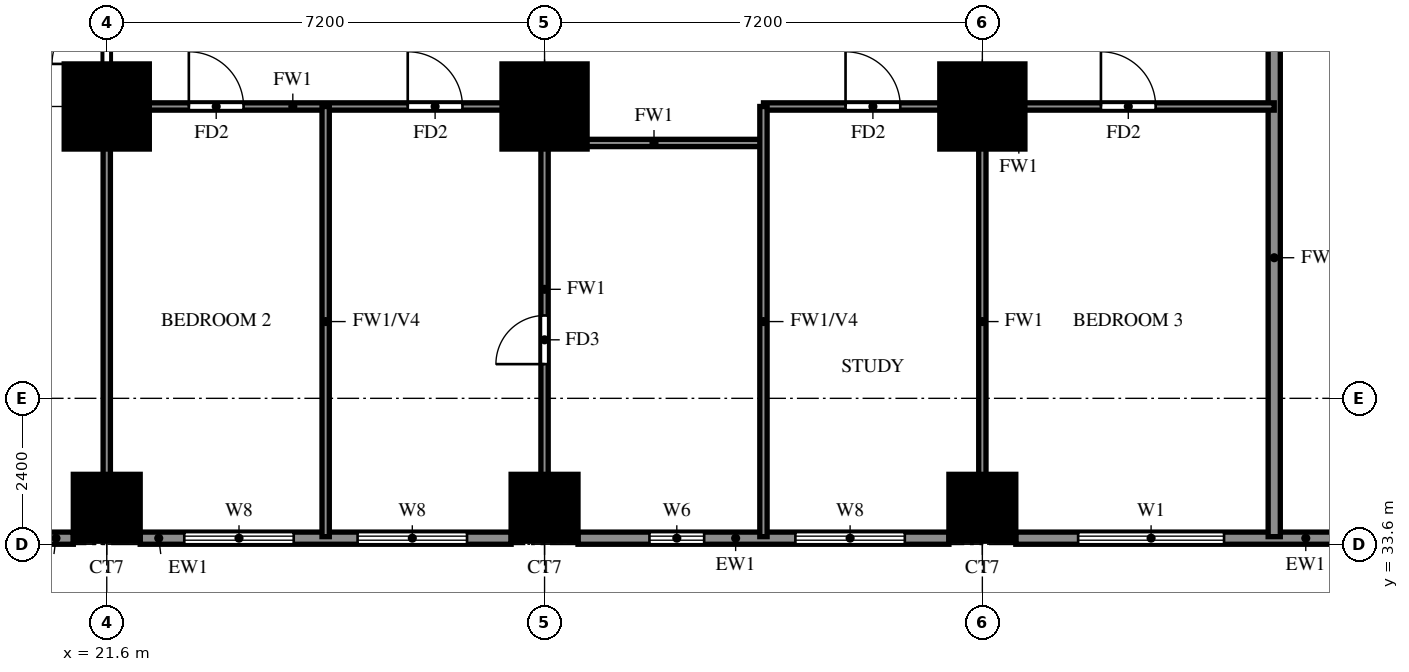
"""IFC4 building model, lengths in metres.
Left out: names, types, materials, properties, quantities, classifications, styles, units other than length and angle.
Written with IfcOpenShell. Run it as: python <this file> out.ifc"""

import sys

from ifc_helpers import new_model, si_unit, direction, frame, frame_2d, origin, origin_2d, place, context, subcontext, project, spatial, rectangle, extrude, source, transform, mapped, element, fill, save


model = new_model("IFC4")
c1 = context("Model", 3, precision=1e-05, world=origin(), true_north=direction((0.0, 1.0)))
c2 = subcontext(c1, "Body", "Model", "MODEL_VIEW")
j1 = project(units=[si_unit("LENGTHUNIT", "METRE"), si_unit("PLANEANGLEUNIT", "RADIAN")], contexts=[c1])
p1 = place(None, origin())
s1 = spatial("IfcSite", under=j1, at=p1, CompositionType="ELEMENT")
p2 = place(p1, origin())
s2 = spatial("IfcBuilding", under=s1, at=p2, CompositionType="ELEMENT")
p3 = place(p2, frame((0.0, 0.0, 30.5)))
s3 = spatial("IfcBuildingStorey", under=s2, at=p3, CompositionType="ELEMENT", Elevation=30.5)
m1 = source(origin(), c2, "Body", "SweptSolid", [
    extrude(rectangle(XDim=1.1, YDim=1.1, at=origin_2d()), origin(), (0.0, 0.0, 1.0), 3.18),
])
for number, where, z_axis, x_axis in (
    (1, (21.6, 34.2, 0.0), (0.0, 0.0, 1.0), (1.0, 0.0, 0.0)),
    (2, (28.8, 34.2, 0.0), (0.0, 0.0, 1.0), (1.0, 0.0, 0.0)),
    (3, (36.0, 34.2, 0.0), (0.0, 0.0, 1.0), (1.0, 0.0, 0.0)),
):
    element("IfcColumn", number, at=place(p3, frame(where, z_axis=z_axis, x_axis=x_axis)), inside=s3, PredefinedType="COLUMN", context=c2, shape_type="MappedRepresentation", body=[
        mapped(m1, transform((0.0, 0.0, 0.0))),
    ])
m2 = source(origin(), c2, "Body", "SweptSolid", [
    extrude(rectangle(XDim=1.4, YDim=1.4, at=origin_2d()), origin(), (0.0, 0.0, 1.0), 3.18),
])
for number, where, z_axis, x_axis in (
    (4, (21.6, 40.8, 0.0), (0.0, 0.0, 1.0), (1.0, 0.0, 0.0)),
    (5, (28.8, 40.8, 0.0), (0.0, 0.0, 1.0), (1.0, 0.0, 0.0)),
    (6, (36.0, 40.8, 0.0), (0.0, 0.0, 1.0), (1.0, 0.0, 0.0)),
):
    element("IfcColumn", number, at=place(p3, frame(where, z_axis=z_axis, x_axis=x_axis)), inside=s3, PredefinedType="COLUMN", context=c2, shape_type="MappedRepresentation", body=[
        mapped(m2, transform((0.0, 0.0, 0.0))),
    ])
p4 = place(p3, frame((18.2, 33.7, 0.0), z_axis=(0.0, 0.0, 1.0), x_axis=(1.0, 0.0, 0.0)))
e7 = element("IfcWall", 7, at=p4, inside=s3, PredefinedType="SOLIDWALL", context=c2, shape_type="SweptSolid", body=[
    extrude(rectangle(XDim=2.85, YDim=0.2, at=frame_2d((1.425, 0.0))), origin(), (0.0, 0.0, 1.0), 3.18),
])
p5 = place(p4, frame((0.525, 0.0, 0.6)))
e8 = element("IfcOpeningElement", 8, at=p5, cuts=e7, PredefinedType="OPENING", context=c2, shape_type="SweptSolid", body=[
    extrude(rectangle(XDim=1.8, YDim=2.4, at=frame_2d((0.9, 1.2))), frame((0.0, 0.11, 0.0), z_axis=(0.0, -1.0, 0.0), x_axis=(1.0, 0.0, 0.0)), (0.0, 0.0, 1.0), 0.22),
])
p6 = place(p3, frame((22.15, 33.7, 0.0), z_axis=(0.0, 0.0, 1.0), x_axis=(1.0, 0.0, 0.0)))
e9 = element("IfcWall", 9, at=p6, inside=s3, PredefinedType="SOLIDWALL", context=c2, shape_type="SweptSolid", body=[
    extrude(rectangle(XDim=6.1, YDim=0.2, at=frame_2d((3.05, 0.0))), origin(), (0.0, 0.0, 1.0), 3.18),
])
p7 = place(p6, frame((0.725, 0.0, 0.6)))
e10 = element("IfcOpeningElement", 10, at=p7, cuts=e9, PredefinedType="OPENING", context=c2, shape_type="SweptSolid", body=[
    extrude(rectangle(XDim=1.8, YDim=2.4, at=frame_2d((0.9, 1.2))), frame((0.0, 0.11, 0.0), z_axis=(0.0, -1.0, 0.0), x_axis=(1.0, 0.0, 0.0)), (0.0, 0.0, 1.0), 0.22),
])
p8 = place(p6, frame((3.575, 0.0, 0.6)))
e11 = element("IfcOpeningElement", 11, at=p8, cuts=e9, PredefinedType="OPENING", context=c2, shape_type="SweptSolid", body=[
    extrude(rectangle(XDim=1.8, YDim=2.4, at=frame_2d((0.9, 1.2))), frame((0.0, 0.11, 0.0), z_axis=(0.0, -1.0, 0.0), x_axis=(1.0, 0.0, 0.0)), (0.0, 0.0, 1.0), 0.22),
])
p9 = place(p3, frame((29.35, 33.7, 0.0), z_axis=(0.0, 0.0, 1.0), x_axis=(1.0, 0.0, 0.0)))
e12 = element("IfcWall", 12, at=p9, inside=s3, PredefinedType="SOLIDWALL", context=c2, shape_type="SweptSolid", body=[
    extrude(rectangle(XDim=6.1, YDim=0.2, at=frame_2d((3.05, 0.0))), origin(), (0.0, 0.0, 1.0), 3.18),
])
p10 = place(p9, frame((1.175, 0.0, 1.5)))
e13 = element("IfcOpeningElement", 13, at=p10, cuts=e12, PredefinedType="OPENING", context=c2, shape_type="SweptSolid", body=[
    extrude(rectangle(XDim=0.9, YDim=0.9, at=frame_2d((0.45, 0.45))), frame((0.0, 0.11, 0.0), z_axis=(0.0, -1.0, 0.0), x_axis=(1.0, 0.0, 0.0)), (0.0, 0.0, 1.0), 0.22),
])
p11 = place(p9, frame((3.575, 0.0, 0.6)))
e14 = element("IfcOpeningElement", 14, at=p11, cuts=e12, PredefinedType="OPENING", context=c2, shape_type="SweptSolid", body=[
    extrude(rectangle(XDim=1.8, YDim=2.4, at=frame_2d((0.9, 1.2))), frame((0.0, 0.11, 0.0), z_axis=(0.0, -1.0, 0.0), x_axis=(1.0, 0.0, 0.0)), (0.0, 0.0, 1.0), 0.22),
])
p12 = place(p3, frame((36.55, 33.7, 0.0), z_axis=(0.0, 0.0, 1.0), x_axis=(1.0, 0.0, 0.0)))
e15 = element("IfcWall", 15, at=p12, inside=s3, PredefinedType="SOLIDWALL", context=c2, shape_type="SweptSolid", body=[
    extrude(rectangle(XDim=5.45, YDim=0.2, at=frame_2d((2.725, 0.0))), origin(), (0.0, 0.0, 1.0), 3.18),
])
p13 = place(p12, frame((1.025, 0.0, 0.6)))
e16 = element("IfcOpeningElement", 16, at=p13, cuts=e15, PredefinedType="OPENING", context=c2, shape_type="SweptSolid", body=[
    extrude(rectangle(XDim=2.4, YDim=2.4, at=frame_2d((1.2, 1.2))), frame((0.0, 0.11, 0.0), z_axis=(0.0, -1.0, 0.0), x_axis=(1.0, 0.0, 0.0)), (0.0, 0.0, 1.0), 0.22),
])
p14 = place(p3, frame((40.8, 33.725, 0.0), z_axis=(0.0, 0.0, 1.0), x_axis=(0.0, 1.0, 0.0)))
e17 = element("IfcWall", 17, at=p14, inside=s3, PredefinedType="SOLIDWALL", context=c2, shape_type="SweptSolid", body=[
    extrude(rectangle(XDim=9.175, YDim=0.2, at=frame_2d((4.587, 0.0))), origin(), (0.0, 0.0, 1.0), 2.28),
])
p15 = place(p3, frame((28.8, 40.2, 0.0), z_axis=(0.0, 0.0, 1.0), x_axis=(1.0, 0.0, 0.0)))
e18 = element("IfcWall", 18, at=p15, inside=s3, PredefinedType="PARTITIONING", context=c2, shape_type="SweptSolid", body=[
    extrude(rectangle(XDim=3.6, YDim=0.12, at=frame_2d((1.8, 0.0))), origin(), (0.0, 0.0, 1.0), 3.18),
])
p16 = place(p3, frame((21.6, 40.8, 0.0), z_axis=(0.0, 0.0, 1.0), x_axis=(1.0, 0.0, 0.0)))
e19 = element("IfcWall", 19, at=p16, inside=s3, PredefinedType="PARTITIONING", context=c2, shape_type="SweptSolid", body=[
    extrude(rectangle(XDim=7.2, YDim=0.12, at=frame_2d((3.6, 0.0))), origin(), (0.0, 0.0, 1.0), 3.18),
])
p17 = place(p16, frame((1.35, 0.0, 0.0)))
e20 = element("IfcOpeningElement", 20, at=p17, cuts=e19, PredefinedType="OPENING", context=c2, shape_type="SweptSolid", body=[
    extrude(rectangle(XDim=0.9, YDim=2.1, at=frame_2d((0.45, 1.05))), frame((0.0, 0.07, 0.0), z_axis=(0.0, -1.0, 0.0), x_axis=(1.0, 0.0, 0.0)), (0.0, 0.0, 1.0), 0.14),
])
p18 = place(p16, frame((4.95, 0.0, 0.0)))
e21 = element("IfcOpeningElement", 21, at=p18, cuts=e19, PredefinedType="OPENING", context=c2, shape_type="SweptSolid", body=[
    extrude(rectangle(XDim=0.9, YDim=2.1, at=frame_2d((0.45, 1.05))), frame((0.0, 0.07, 0.0), z_axis=(0.0, -1.0, 0.0), x_axis=(1.0, 0.0, 0.0)), (0.0, 0.0, 1.0), 0.14),
])
p19 = place(p3, frame((32.4, 40.8, 0.0), z_axis=(0.0, 0.0, 1.0), x_axis=(1.0, 0.0, 0.0)))
e22 = element("IfcWall", 22, at=p19, inside=s3, PredefinedType="PARTITIONING", context=c2, shape_type="SweptSolid", body=[
    extrude(rectangle(XDim=8.4, YDim=0.12, at=frame_2d((4.2, 0.0))), origin(), (0.0, 0.0, 1.0), 3.18),
])
p20 = place(p19, frame((1.35, 0.0, 0.0)))
e23 = element("IfcOpeningElement", 23, at=p20, cuts=e22, PredefinedType="OPENING", context=c2, shape_type="SweptSolid", body=[
    extrude(rectangle(XDim=0.9, YDim=2.1, at=frame_2d((0.45, 1.05))), frame((0.0, 0.07, 0.0), z_axis=(0.0, -1.0, 0.0), x_axis=(1.0, 0.0, 0.0)), (0.0, 0.0, 1.0), 0.14),
])
p21 = place(p19, frame((5.55, 0.0, 0.0)))
e24 = element("IfcOpeningElement", 24, at=p21, cuts=e22, PredefinedType="OPENING", context=c2, shape_type="SweptSolid", body=[
    extrude(rectangle(XDim=0.9, YDim=2.1, at=frame_2d((0.45, 1.05))), frame((0.0, 0.07, 0.0), z_axis=(0.0, -1.0, 0.0), x_axis=(1.0, 0.0, 0.0)), (0.0, 0.0, 1.0), 0.14),
])
p22 = place(p3, frame((21.6, 33.725, 0.0), z_axis=(0.0, 0.0, 1.0), x_axis=(0.0, 1.0, 0.0)))
e25 = element("IfcWall", 25, at=p22, inside=s3, PredefinedType="PARTITIONING", context=c2, shape_type="SweptSolid", body=[
    extrude(rectangle(XDim=35.875, YDim=0.12, at=frame_2d((17.938, 0.0))), origin(), (0.0, 0.0, 1.0), 3.18),
])
p23 = place(p22, frame((7.775, 0.0, 0.0)))
e26 = element("IfcOpeningElement", 26, at=p23, cuts=e25, PredefinedType="OPENING", context=c2, shape_type="SweptSolid", body=[
    extrude(rectangle(XDim=0.9, YDim=2.1, at=frame_2d((0.45, 1.05))), frame((0.0, 0.07, 0.0), z_axis=(0.0, -1.0, 0.0), x_axis=(1.0, 0.0, 0.0)), (0.0, 0.0, 1.0), 0.14),
])
p24 = place(p22, frame((15.625, 0.0, 0.0)))
e27 = element("IfcOpeningElement", 27, at=p24, cuts=e25, PredefinedType="OPENING", context=c2, shape_type="SweptSolid", body=[
    extrude(rectangle(XDim=0.9, YDim=2.1, at=frame_2d((0.45, 1.05))), frame((0.0, 0.07, 0.0), z_axis=(0.0, -1.0, 0.0), x_axis=(1.0, 0.0, 0.0)), (0.0, 0.0, 1.0), 0.14),
])
p25 = place(p22, frame((22.225, 0.0, 0.0)))
e28 = element("IfcOpeningElement", 28, at=p25, cuts=e25, PredefinedType="OPENING", context=c2, shape_type="SweptSolid", body=[
    extrude(rectangle(XDim=1.5, YDim=2.1, at=frame_2d((0.75, 1.05))), frame((0.0, 0.07, 0.0), z_axis=(0.0, -1.0, 0.0), x_axis=(1.0, 0.0, 0.0)), (0.0, 0.0, 1.0), 0.14),
])
p26 = place(p22, frame((26.425, 0.0, 0.0)))
e29 = element("IfcOpeningElement", 29, at=p26, cuts=e25, PredefinedType="OPENING", context=c2, shape_type="SweptSolid", body=[
    extrude(rectangle(XDim=0.9, YDim=2.1, at=frame_2d((0.45, 1.05))), frame((0.0, 0.07, 0.0), z_axis=(0.0, -1.0, 0.0), x_axis=(1.0, 0.0, 0.0)), (0.0, 0.0, 1.0), 0.14),
])
p27 = place(p22, frame((30.025, 0.0, 0.0)))
e30 = element("IfcOpeningElement", 30, at=p27, cuts=e25, PredefinedType="OPENING", context=c2, shape_type="SweptSolid", body=[
    extrude(rectangle(XDim=0.9, YDim=2.1, at=frame_2d((0.45, 1.05))), frame((0.0, 0.07, 0.0), z_axis=(0.0, -1.0, 0.0), x_axis=(1.0, 0.0, 0.0)), (0.0, 0.0, 1.0), 0.14),
])
p28 = place(p22, frame((33.625, 0.0, 0.0)))
e31 = element("IfcOpeningElement", 31, at=p28, cuts=e25, PredefinedType="OPENING", context=c2, shape_type="SweptSolid", body=[
    extrude(rectangle(XDim=0.9, YDim=2.1, at=frame_2d((0.45, 1.05))), frame((0.0, 0.07, 0.0), z_axis=(0.0, -1.0, 0.0), x_axis=(1.0, 0.0, 0.0)), (0.0, 0.0, 1.0), 0.14),
])
p29 = place(p3, frame((25.2, 33.725, 0.0), z_axis=(0.0, 0.0, 1.0), x_axis=(0.0, 1.0, 0.0)))
e32 = element("IfcWall", 32, at=p29, inside=s3, PredefinedType="PARTITIONING", context=c2, shape_type="SweptSolid", body=[
    extrude(rectangle(XDim=7.075, YDim=0.12, at=frame_2d((3.538, 0.0))), origin(), (0.0, 0.0, 1.0), 2.28),
])
p30 = place(p3, frame((28.8, 33.725, 0.0), z_axis=(0.0, 0.0, 1.0), x_axis=(0.0, 1.0, 0.0)))
e33 = element("IfcWall", 33, at=p30, inside=s3, PredefinedType="PARTITIONING", context=c2, shape_type="SweptSolid", body=[
    extrude(rectangle(XDim=7.075, YDim=0.12, at=frame_2d((3.538, 0.0))), origin(), (0.0, 0.0, 1.0), 3.18),
])
p31 = place(p30, frame((2.837, 0.0, 0.0)))
e34 = element("IfcOpeningElement", 34, at=p31, cuts=e33, PredefinedType="OPENING", context=c2, shape_type="SweptSolid", body=[
    extrude(rectangle(XDim=0.8, YDim=2.1, at=frame_2d((0.4, 1.05))), frame((0.0, 0.07, 0.0), z_axis=(0.0, -1.0, 0.0), x_axis=(1.0, 0.0, 0.0)), (0.0, 0.0, 1.0), 0.14),
])
p32 = place(p3, frame((32.4, 33.725, 0.0), z_axis=(0.0, 0.0, 1.0), x_axis=(0.0, 1.0, 0.0)))
e35 = element("IfcWall", 35, at=p32, inside=s3, PredefinedType="PARTITIONING", context=c2, shape_type="SweptSolid", body=[
    extrude(rectangle(XDim=7.075, YDim=0.12, at=frame_2d((3.538, 0.0))), origin(), (0.0, 0.0, 1.0), 2.28),
])
p33 = place(p3, frame((36.0, 33.725, 0.0), z_axis=(0.0, 0.0, 1.0), x_axis=(0.0, 1.0, 0.0)))
e36 = element("IfcWall", 36, at=p33, inside=s3, PredefinedType="PARTITIONING", context=c2, shape_type="SweptSolid", body=[
    extrude(rectangle(XDim=7.075, YDim=0.12, at=frame_2d((3.538, 0.0))), origin(), (0.0, 0.0, 1.0), 3.18),
])
p34 = place(p7, origin())
e37 = element("IfcWindow", 37, at=p34, inside=s3, PartitioningType="DOUBLE_PANEL_VERTICAL", PredefinedType="WINDOW", context=c2, shape_type="SweptSolid", body=[
    extrude(rectangle(XDim=1.8, YDim=2.4, at=frame_2d((0.9, 1.2))), frame((0.0, 0.03, 0.0), z_axis=(0.0, -1.0, 0.0), x_axis=(1.0, 0.0, 0.0)), (0.0, 0.0, 1.0), 0.06),
])
fill(e10, e37)
p35 = place(p8, origin())
e38 = element("IfcWindow", 38, at=p35, inside=s3, PartitioningType="DOUBLE_PANEL_VERTICAL", PredefinedType="WINDOW", context=c2, shape_type="SweptSolid", body=[
    extrude(rectangle(XDim=1.8, YDim=2.4, at=frame_2d((0.9, 1.2))), frame((0.0, 0.03, 0.0), z_axis=(0.0, -1.0, 0.0), x_axis=(1.0, 0.0, 0.0)), (0.0, 0.0, 1.0), 0.06),
])
fill(e11, e38)
p36 = place(p10, origin())
e39 = element("IfcWindow", 39, at=p36, inside=s3, PartitioningType="SINGLE_PANEL", PredefinedType="WINDOW", context=c2, shape_type="SweptSolid", body=[
    extrude(rectangle(XDim=0.9, YDim=0.9, at=frame_2d((0.45, 0.45))), frame((0.0, 0.03, 0.0), z_axis=(0.0, -1.0, 0.0), x_axis=(1.0, 0.0, 0.0)), (0.0, 0.0, 1.0), 0.06),
])
fill(e13, e39)
p37 = place(p11, origin())
e40 = element("IfcWindow", 40, at=p37, inside=s3, PartitioningType="DOUBLE_PANEL_VERTICAL", PredefinedType="WINDOW", context=c2, shape_type="SweptSolid", body=[
    extrude(rectangle(XDim=1.8, YDim=2.4, at=frame_2d((0.9, 1.2))), frame((0.0, 0.03, 0.0), z_axis=(0.0, -1.0, 0.0), x_axis=(1.0, 0.0, 0.0)), (0.0, 0.0, 1.0), 0.06),
])
fill(e14, e40)
p38 = place(p13, origin())
e41 = element("IfcWindow", 41, at=p38, inside=s3, PartitioningType="DOUBLE_PANEL_VERTICAL", PredefinedType="WINDOW", context=c2, shape_type="SweptSolid", body=[
    extrude(rectangle(XDim=2.4, YDim=2.4, at=frame_2d((1.2, 1.2))), frame((0.0, 0.03, 0.0), z_axis=(0.0, -1.0, 0.0), x_axis=(1.0, 0.0, 0.0)), (0.0, 0.0, 1.0), 0.06),
])
fill(e16, e41)
p39 = place(p23, origin())
e42 = element("IfcDoor", 42, at=p39, inside=s3, OperationType="SINGLE_SWING_RIGHT", PredefinedType="DOOR", context=c2, shape_type="SweptSolid", body=[
    extrude(rectangle(XDim=0.9, YDim=2.1, at=frame_2d((0.45, 1.05))), frame((0.0, 0.025, 0.0), z_axis=(0.0, -1.0, 0.0), x_axis=(1.0, 0.0, 0.0)), (0.0, 0.0, 1.0), 0.05),
])
fill(e26, e42)
p40 = place(p17, origin())
e43 = element("IfcDoor", 43, at=p40, inside=s3, OperationType="SINGLE_SWING_LEFT", PredefinedType="DOOR", context=c2, shape_type="SweptSolid", body=[
    extrude(rectangle(XDim=0.9, YDim=2.1, at=frame_2d((0.45, 1.05))), frame((0.0, 0.025, 0.0), z_axis=(0.0, -1.0, 0.0), x_axis=(1.0, 0.0, 0.0)), (0.0, 0.0, 1.0), 0.05),
])
fill(e20, e43)
p41 = place(p18, origin())
e44 = element("IfcDoor", 44, at=p41, inside=s3, OperationType="SINGLE_SWING_RIGHT", PredefinedType="DOOR", context=c2, shape_type="SweptSolid", body=[
    extrude(rectangle(XDim=0.9, YDim=2.1, at=frame_2d((0.45, 1.05))), frame((0.0, 0.025, 0.0), z_axis=(0.0, -1.0, 0.0), x_axis=(1.0, 0.0, 0.0)), (0.0, 0.0, 1.0), 0.05),
])
fill(e21, e44)
p42 = place(p31, origin())
e45 = element("IfcDoor", 45, at=p42, inside=s3, OperationType="SINGLE_SWING_LEFT", PredefinedType="DOOR", context=c2, shape_type="SweptSolid", body=[
    extrude(rectangle(XDim=0.8, YDim=2.1, at=frame_2d((0.4, 1.05))), frame((0.0, 0.025, 0.0), z_axis=(0.0, -1.0, 0.0), x_axis=(1.0, 0.0, 0.0)), (0.0, 0.0, 1.0), 0.05),
])
fill(e34, e45)
p43 = place(p20, origin())
e46 = element("IfcDoor", 46, at=p43, inside=s3, OperationType="SINGLE_SWING_LEFT", PredefinedType="DOOR", context=c2, shape_type="SweptSolid", body=[
    extrude(rectangle(XDim=0.9, YDim=2.1, at=frame_2d((0.45, 1.05))), frame((0.0, 0.025, 0.0), z_axis=(0.0, -1.0, 0.0), x_axis=(1.0, 0.0, 0.0)), (0.0, 0.0, 1.0), 0.05),
])
fill(e23, e46)
p44 = place(p21, origin())
e47 = element("IfcDoor", 47, at=p44, inside=s3, OperationType="SINGLE_SWING_RIGHT", PredefinedType="DOOR", context=c2, shape_type="SweptSolid", body=[
    extrude(rectangle(XDim=0.9, YDim=2.1, at=frame_2d((0.45, 1.05))), frame((0.0, 0.025, 0.0), z_axis=(0.0, -1.0, 0.0), x_axis=(1.0, 0.0, 0.0)), (0.0, 0.0, 1.0), 0.05),
])
fill(e24, e47)
save(model, sys.argv[1])
